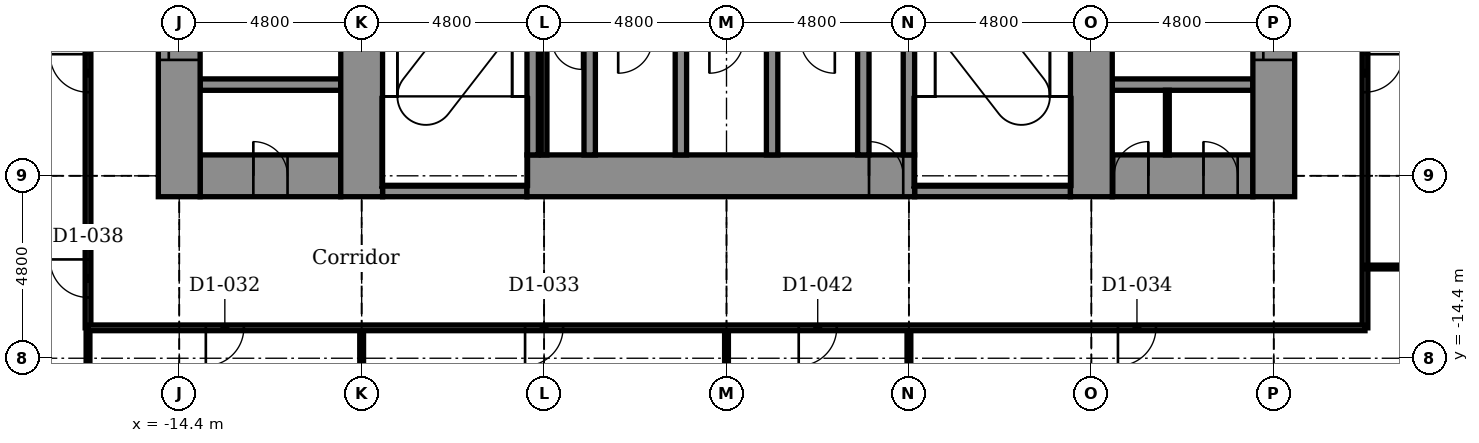
"""IFC4 building model, lengths in metres.
Left out: names, types, materials, properties, quantities, classifications, styles, units other than length and angle.
Written with IfcOpenShell. Run it as: python <this file> out.ifc"""

import sys

from ifc_helpers import new_model, si_unit, direction, frame, frame_2d, origin, place, context, subcontext, project, spatial, rectangle, extrude, element, fill, save


model = new_model("IFC4")
c1 = context("Model", 3, precision=1e-05, world=origin(), true_north=direction((0.0, 1.0)))
c2 = subcontext(c1, "Body", "Model", "MODEL_VIEW")
j1 = project(units=[si_unit("LENGTHUNIT", "METRE"), si_unit("PLANEANGLEUNIT", "RADIAN")], contexts=[c1])
p1 = place(None, origin())
s1 = spatial("IfcSite", under=j1, at=p1, CompositionType="ELEMENT")
p2 = place(p1, origin())
s2 = spatial("IfcBuilding", under=s1, at=p2, CompositionType="ELEMENT")
p3 = place(p2, frame((0.0, 0.0, 12.4)))
s3 = spatial("IfcBuildingStorey", under=s2, at=p3, CompositionType="ELEMENT", Elevation=12.4)
p4 = place(p3, frame((-9.05, -10.0, -0.3), z_axis=(0.0, 0.0, 1.0), x_axis=(1.0, 0.0, 0.0)))
e1 = element("IfcWall", 1, at=p4, inside=s3, PredefinedType="STANDARD", context=c2, shape_type="SweptSolid", body=[
    extrude(rectangle(XDim=3.8, YDim=0.3, at=frame_2d((1.9, 0.0))), origin(), (0.0, 0.0, 1.0), 5.05),
])
p5 = place(p3, frame((4.95, -10.0, -0.3), z_axis=(0.0, 0.0, 1.0), x_axis=(1.0, 0.0, 0.0)))
e2 = element("IfcWall", 2, at=p5, inside=s3, PredefinedType="STANDARD", context=c2, shape_type="SweptSolid", body=[
    extrude(rectangle(XDim=4.1, YDim=0.3, at=frame_2d((2.05, 0.0))), origin(), (0.0, 0.0, 1.0), 5.05),
])
p6 = place(p3, frame((-13.85, -9.6, -0.3), z_axis=(0.0, 0.0, 1.0), x_axis=(1.0, 0.0, 0.0)))
e3 = element("IfcWall", 3, at=p6, inside=s3, PredefinedType="SHEAR", context=c2, shape_type="SweptSolid", body=[
    extrude(rectangle(XDim=3.7, YDim=1.1, at=frame_2d((1.85, 0.0))), origin(), (0.0, 0.0, 1.0), 5.05),
])
p7 = place(p6, frame((1.4, 0.0, 0.3)))
e4 = element("IfcOpeningElement", 4, at=p7, cuts=e3, PredefinedType="OPENING", context=c2, shape_type="SweptSolid", body=[
    extrude(rectangle(XDim=0.9, YDim=2.1, at=frame_2d((0.45, 1.05))), frame((0.0, 0.56, 0.0), z_axis=(0.0, -1.0, 0.0), x_axis=(1.0, 0.0, 0.0)), (0.0, 0.0, 1.0), 1.12),
])
p8 = place(p3, frame((-5.25, -9.6, -0.3), z_axis=(0.0, 0.0, 1.0), x_axis=(1.0, 0.0, 0.0)))
e5 = element("IfcWall", 5, at=p8, inside=s3, PredefinedType="SHEAR", context=c2, shape_type="SweptSolid", body=[
    extrude(rectangle(XDim=10.2, YDim=1.1, at=frame_2d((5.1, 0.0))), origin(), (0.0, 0.0, 1.0), 5.05),
])
p9 = place(p8, frame((9.0, 0.0, 0.3)))
e6 = element("IfcOpeningElement", 6, at=p9, cuts=e5, PredefinedType="OPENING", context=c2, shape_type="SweptSolid", body=[
    extrude(rectangle(XDim=0.9, YDim=2.1, at=frame_2d((0.45, 1.05))), frame((0.0, 0.56, 0.0), z_axis=(0.0, -1.0, 0.0), x_axis=(1.0, 0.0, 0.0)), (0.0, 0.0, 1.0), 1.12),
])
p10 = place(p3, frame((10.15, -9.6, -0.3), z_axis=(0.0, 0.0, 1.0), x_axis=(1.0, 0.0, 0.0)))
e7 = element("IfcWall", 7, at=p10, inside=s3, PredefinedType="SHEAR", context=c2, shape_type="SweptSolid", body=[
    extrude(rectangle(XDim=3.7, YDim=1.1, at=frame_2d((1.85, 0.0))), origin(), (0.0, 0.0, 1.0), 5.05),
])
p11 = place(p10, frame((0.05, 0.0, 0.3)))
e8 = element("IfcOpeningElement", 8, at=p11, cuts=e7, PredefinedType="OPENING", context=c2, shape_type="SweptSolid", body=[
    extrude(rectangle(XDim=0.9, YDim=2.1, at=frame_2d((0.45, 1.05))), frame((0.0, 0.56, 0.0), z_axis=(0.0, -1.0, 0.0), x_axis=(1.0, 0.0, 0.0)), (0.0, 0.0, 1.0), 1.12),
])
p12 = place(p10, frame((2.4, 0.0, 0.3)))
e9 = element("IfcOpeningElement", 9, at=p12, cuts=e7, PredefinedType="OPENING", context=c2, shape_type="SweptSolid", body=[
    extrude(rectangle(XDim=0.9, YDim=2.1, at=frame_2d((0.45, 1.05))), frame((0.0, 0.56, 0.0), z_axis=(0.0, -1.0, 0.0), x_axis=(1.0, 0.0, 0.0)), (0.0, 0.0, 1.0), 1.12),
])
for number, where, z_axis, x_axis in (
    (10, (-13.85, -7.2, -0.3), (0.0, 0.0, 1.0), (1.0, 0.0, 0.0)),
    (11, (10.15, -7.2, -0.3), (0.0, 0.0, 1.0), (1.0, 0.0, 0.0)),
):
    element("IfcWall", number, at=place(p3, frame(where, z_axis=z_axis, x_axis=x_axis)), inside=s3, PredefinedType="STANDARD", context=c2, shape_type="SweptSolid", body=[
        extrude(rectangle(XDim=3.7, YDim=0.3, at=frame_2d((1.85, 0.0))), origin(), (0.0, 0.0, 1.0), 5.05),
    ])
p13 = place(p3, frame((-14.4, -10.15, -0.3), z_axis=(0.0, 0.0, 1.0), x_axis=(0.0, 1.0, 0.0)))
e12 = element("IfcWall", 12, at=p13, inside=s3, PredefinedType="SHEAR", context=c2, shape_type="SweptSolid", body=[
    extrude(rectangle(XDim=20.3, YDim=1.1, at=frame_2d((10.15, 0.0))), origin(), (0.0, 0.0, 1.0), 5.05),
])
p14 = place(p13, frame((3.6, 0.0, 0.3)))
e13 = element("IfcOpeningElement", 13, at=p14, cuts=e12, PredefinedType="OPENING", context=c2, shape_type="SweptSolid", body=[
    extrude(rectangle(XDim=1.1, YDim=2.1, at=frame_2d((0.55, 1.05))), frame((0.0, 0.56, 0.0), z_axis=(0.0, -1.0, 0.0), x_axis=(1.0, 0.0, 0.0)), (0.0, 0.0, 1.0), 1.12),
])
p15 = place(p13, frame((6.0, 0.0, 0.3)))
e14 = element("IfcOpeningElement", 14, at=p15, cuts=e12, PredefinedType="OPENING", context=c2, shape_type="SweptSolid", body=[
    extrude(rectangle(XDim=1.1, YDim=2.1, at=frame_2d((0.55, 1.05))), frame((0.0, 0.56, 0.0), z_axis=(0.0, -1.0, 0.0), x_axis=(1.0, 0.0, 0.0)), (0.0, 0.0, 1.0), 1.12),
])
p16 = place(p13, frame((8.4, 0.0, 0.3)))
e15 = element("IfcOpeningElement", 15, at=p16, cuts=e12, PredefinedType="OPENING", context=c2, shape_type="SweptSolid", body=[
    extrude(rectangle(XDim=1.1, YDim=2.1, at=frame_2d((0.55, 1.05))), frame((0.0, 0.56, 0.0), z_axis=(0.0, -1.0, 0.0), x_axis=(1.0, 0.0, 0.0)), (0.0, 0.0, 1.0), 1.12),
])
p17 = place(p13, frame((10.8, 0.0, 0.3)))
e16 = element("IfcOpeningElement", 16, at=p17, cuts=e12, PredefinedType="OPENING", context=c2, shape_type="SweptSolid", body=[
    extrude(rectangle(XDim=1.1, YDim=2.1, at=frame_2d((0.55, 1.05))), frame((0.0, 0.56, 0.0), z_axis=(0.0, -1.0, 0.0), x_axis=(1.0, 0.0, 0.0)), (0.0, 0.0, 1.0), 1.12),
])
p18 = place(p3, frame((-9.6, -10.15, -0.3), z_axis=(0.0, 0.0, 1.0), x_axis=(0.0, 1.0, 0.0)))
e17 = element("IfcWall", 17, at=p18, inside=s3, PredefinedType="SHEAR", context=c2, shape_type="SweptSolid", body=[
    extrude(rectangle(XDim=7.6, YDim=1.1, at=frame_2d((3.8, 0.0))), origin(), (0.0, 0.0, 1.0), 5.05),
])
p19 = place(p3, frame((-5.1, -9.05, -0.3), z_axis=(0.0, 0.0, 1.0), x_axis=(0.0, 1.0, 0.0)))
e18 = element("IfcWall", 18, at=p19, inside=s3, PredefinedType="STANDARD", context=c2, shape_type="SweptSolid", body=[
    extrude(rectangle(XDim=6.8, YDim=0.3, at=frame_2d((3.4, 0.0))), origin(), (0.0, 0.0, 1.0), 5.05),
])
p20 = place(p19, frame((3.6, 0.0, 0.3)))
e19 = element("IfcOpeningElement", 19, at=p20, cuts=e18, PredefinedType="OPENING", context=c2, shape_type="SweptSolid", body=[
    extrude(rectangle(XDim=1.2, YDim=2.1, at=frame_2d((0.6, 1.05))), frame((0.0, 0.16, 0.0), z_axis=(0.0, -1.0, 0.0), x_axis=(1.0, 0.0, 0.0)), (0.0, 0.0, 1.0), 0.32),
])
for number, where, z_axis, x_axis in (
    (20, (-3.6, -9.05, -0.3), (0.0, 0.0, 1.0), (0.0, 1.0, 0.0)),
    (21, (-1.2, -9.05, -0.3), (0.0, 0.0, 1.0), (0.0, 1.0, 0.0)),
    (22, (1.2, -9.05, -0.3), (0.0, 0.0, 1.0), (0.0, 1.0, 0.0)),
    (23, (3.6, -9.05, -0.3), (0.0, 0.0, 1.0), (0.0, 1.0, 0.0)),
):
    element("IfcWall", number, at=place(p3, frame(where, z_axis=z_axis, x_axis=x_axis)), inside=s3, PredefinedType="STANDARD", context=c2, shape_type="SweptSolid", body=[
        extrude(rectangle(XDim=3.2, YDim=0.3, at=frame_2d((1.6, 0.0))), origin(), (0.0, 0.0, 1.0), 5.05),
    ])
p21 = place(p3, frame((4.8, -9.05, -0.3), z_axis=(0.0, 0.0, 1.0), x_axis=(0.0, 1.0, 0.0)))
e24 = element("IfcWall", 24, at=p21, inside=s3, PredefinedType="STANDARD", context=c2, shape_type="SweptSolid", body=[
    extrude(rectangle(XDim=6.8, YDim=0.3, at=frame_2d((3.4, 0.0))), origin(), (0.0, 0.0, 1.0), 5.05),
])
p22 = place(p21, frame((3.6, 0.0, 0.3)))
e25 = element("IfcOpeningElement", 25, at=p22, cuts=e24, PredefinedType="OPENING", context=c2, shape_type="SweptSolid", body=[
    extrude(rectangle(XDim=1.2, YDim=2.1, at=frame_2d((0.6, 1.05))), frame((0.0, 0.16, 0.0), z_axis=(0.0, -1.0, 0.0), x_axis=(1.0, 0.0, 0.0)), (0.0, 0.0, 1.0), 0.32),
])
p23 = place(p3, frame((9.6, -10.15, -0.3), z_axis=(0.0, 0.0, 1.0), x_axis=(0.0, 1.0, 0.0)))
e26 = element("IfcWall", 26, at=p23, inside=s3, PredefinedType="SHEAR", context=c2, shape_type="SweptSolid", body=[
    extrude(rectangle(XDim=20.3, YDim=1.1, at=frame_2d((10.15, 0.0))), origin(), (0.0, 0.0, 1.0), 5.05),
])
p24 = place(p3, frame((14.4, -10.15, -0.3), z_axis=(0.0, 0.0, 1.0), x_axis=(0.0, 1.0, 0.0)))
e27 = element("IfcWall", 27, at=p24, inside=s3, PredefinedType="SHEAR", context=c2, shape_type="SweptSolid", body=[
    extrude(rectangle(XDim=20.3, YDim=1.1, at=frame_2d((10.15, 0.0))), origin(), (0.0, 0.0, 1.0), 5.05),
])
p25 = place(p24, frame((3.6, 0.0, 0.3)))
e28 = element("IfcOpeningElement", 28, at=p25, cuts=e27, PredefinedType="OPENING", context=c2, shape_type="SweptSolid", body=[
    extrude(rectangle(XDim=1.1, YDim=2.1, at=frame_2d((0.55, 1.05))), frame((0.0, 0.56, 0.0), z_axis=(0.0, -1.0, 0.0), x_axis=(1.0, 0.0, 0.0)), (0.0, 0.0, 1.0), 1.12),
])
p26 = place(p24, frame((6.0, 0.0, 0.3)))
e29 = element("IfcOpeningElement", 29, at=p26, cuts=e27, PredefinedType="OPENING", context=c2, shape_type="SweptSolid", body=[
    extrude(rectangle(XDim=1.1, YDim=2.1, at=frame_2d((0.55, 1.05))), frame((0.0, 0.56, 0.0), z_axis=(0.0, -1.0, 0.0), x_axis=(1.0, 0.0, 0.0)), (0.0, 0.0, 1.0), 1.12),
])
p27 = place(p24, frame((8.4, 0.0, 0.3)))
e30 = element("IfcOpeningElement", 30, at=p27, cuts=e27, PredefinedType="OPENING", context=c2, shape_type="SweptSolid", body=[
    extrude(rectangle(XDim=1.1, YDim=2.1, at=frame_2d((0.55, 1.05))), frame((0.0, 0.56, 0.0), z_axis=(0.0, -1.0, 0.0), x_axis=(1.0, 0.0, 0.0)), (0.0, 0.0, 1.0), 1.12),
])
p28 = place(p24, frame((10.8, 0.0, 0.3)))
e31 = element("IfcOpeningElement", 31, at=p28, cuts=e27, PredefinedType="OPENING", context=c2, shape_type="SweptSolid", body=[
    extrude(rectangle(XDim=1.1, YDim=2.1, at=frame_2d((0.55, 1.05))), frame((0.0, 0.56, 0.0), z_axis=(0.0, -1.0, 0.0), x_axis=(1.0, 0.0, 0.0)), (0.0, 0.0, 1.0), 1.12),
])
p29 = place(p3, frame((16.8, -13.6, 0.0), z_axis=(0.0, 0.0, 1.0), x_axis=(0.0, 1.0, 0.0)))
e32 = element("IfcWall", 32, at=p29, inside=s3, PredefinedType="PARTITIONING", context=c2, shape_type="SweptSolid", body=[
    extrude(rectangle(XDim=9.65, YDim=0.15, at=frame_2d((4.825, 0.0))), origin(), (0.0, 0.0, 1.0), 4.7),
])
p30 = place(p29, frame((6.2, 0.0, 0.0)))
e33 = element("IfcOpeningElement", 33, at=p30, cuts=e32, PredefinedType="OPENING", context=c2, shape_type="SweptSolid", body=[
    extrude(rectangle(XDim=1.0, YDim=2.1, at=frame_2d((0.5, 1.05))), frame((0.0, 0.085, 0.0), z_axis=(0.0, -1.0, 0.0), x_axis=(1.0, 0.0, 0.0)), (0.0, 0.0, 1.0), 0.17),
])
p31 = place(p3, frame((11.6, -9.05, 0.0), z_axis=(0.0, 0.0, 1.0), x_axis=(0.0, 1.0, 0.0)))
e34 = element("IfcWall", 34, at=p31, inside=s3, PredefinedType="PARTITIONING", context=c2, shape_type="SweptSolid", body=[
    extrude(rectangle(XDim=1.7, YDim=0.1, at=frame_2d((0.85, 0.0))), origin(), (0.0, 0.0, 1.0), 4.7),
])
p32 = place(p3, frame((4.8, -19.126, 0.0), z_axis=(0.0, 0.0, 1.0), x_axis=(0.0, 1.0, 0.0)))
e35 = element("IfcWall", 35, at=p32, inside=s3, PredefinedType="PARTITIONING", context=c2, shape_type="SweptSolid", body=[
    extrude(rectangle(XDim=5.526, YDim=0.1, at=frame_2d((2.763, 0.0))), origin(), (0.0, 0.0, 1.0), 4.343),
])
p33 = place(p3, frame((0.0, -18.64, 0.0), z_axis=(0.0, 0.0, 1.0), x_axis=(0.0, 1.0, 0.0)))
e36 = element("IfcWall", 36, at=p33, inside=s3, PredefinedType="PARTITIONING", context=c2, shape_type="SweptSolid", body=[
    extrude(rectangle(XDim=5.04, YDim=0.1, at=frame_2d((2.52, 0.0))), origin(), (0.0, 0.0, 1.0), 4.343),
])
p34 = place(p3, frame((-4.8, -9.05, 0.0), z_axis=(0.0, 0.0, 1.0), x_axis=(0.0, 1.0, 0.0)))
e37 = element("IfcWall", 37, at=p34, inside=s3, PredefinedType="PARTITIONING", context=c2, shape_type="SweptSolid", body=[
    extrude(rectangle(XDim=3.05, YDim=0.15, at=frame_2d((1.525, 0.0))), origin(), (0.0, 0.0, 1.0), 4.7),
])
p35 = place(p3, frame((-9.6, -18.64, 0.0), z_axis=(0.0, 0.0, 1.0), x_axis=(0.0, 1.0, 0.0)))
e38 = element("IfcWall", 38, at=p35, inside=s3, PredefinedType="PARTITIONING", context=c2, shape_type="SweptSolid", body=[
    extrude(rectangle(XDim=5.04, YDim=0.1, at=frame_2d((2.52, 0.0))), origin(), (0.0, 0.0, 1.0), 4.343),
])
p36 = place(p3, frame((-16.8, -41.399, 0.0), z_axis=(0.0, 0.0, 1.0), x_axis=(0.0, 1.0, 0.0)))
e39 = element("IfcWall", 39, at=p36, inside=s3, PredefinedType="PARTITIONING", context=c2, shape_type="SweptSolid", body=[
    extrude(rectangle(XDim=27.799, YDim=0.1, at=frame_2d((13.899, 0.0))), origin(), (0.0, 0.0, 1.0), 4.7),
])
p37 = place(p3, frame((-16.8, -13.6, 0.0), z_axis=(0.0, 0.0, 1.0), x_axis=(0.0, 1.0, 0.0)))
e40 = element("IfcWall", 40, at=p37, inside=s3, PredefinedType="PARTITIONING", context=c2, shape_type="SweptSolid", body=[
    extrude(rectangle(XDim=9.65, YDim=0.15, at=frame_2d((4.825, 0.0))), origin(), (0.0, 0.0, 1.0), 4.7),
])
p38 = place(p37, frame((0.8, 0.0, 0.0)))
e41 = element("IfcOpeningElement", 41, at=p38, cuts=e40, PredefinedType="OPENING", context=c2, shape_type="SweptSolid", body=[
    extrude(rectangle(XDim=1.0, YDim=2.1, at=frame_2d((0.5, 1.05))), frame((0.0, 0.085, 0.0), z_axis=(0.0, -1.0, 0.0), x_axis=(1.0, 0.0, 0.0)), (0.0, 0.0, 1.0), 0.17),
])
p39 = place(p37, frame((6.2, 0.0, 0.0)))
e42 = element("IfcOpeningElement", 42, at=p39, cuts=e40, PredefinedType="OPENING", context=c2, shape_type="SweptSolid", body=[
    extrude(rectangle(XDim=1.0, YDim=2.1, at=frame_2d((0.5, 1.05))), frame((0.0, 0.085, 0.0), z_axis=(0.0, -1.0, 0.0), x_axis=(1.0, 0.0, 0.0)), (0.0, 0.0, 1.0), 0.17),
])
p40 = place(p3, frame((-16.8, -13.6, 0.0), z_axis=(0.0, 0.0, 1.0), x_axis=(1.0, 0.0, 0.0)))
e43 = element("IfcWall", 43, at=p40, inside=s3, PredefinedType="PARTITIONING", context=c2, shape_type="SweptSolid", body=[
    extrude(rectangle(XDim=33.6, YDim=0.15, at=frame_2d((16.8, 0.0))), origin(), (0.0, 0.0, 1.0), 4.7),
])
p41 = place(p40, frame((3.1, 0.0, 0.0)))
e44 = element("IfcOpeningElement", 44, at=p41, cuts=e43, PredefinedType="OPENING", context=c2, shape_type="SweptSolid", body=[
    extrude(rectangle(XDim=1.0, YDim=2.1, at=frame_2d((0.5, 1.05))), frame((0.0, 0.085, 0.0), z_axis=(0.0, -1.0, 0.0), x_axis=(1.0, 0.0, 0.0)), (0.0, 0.0, 1.0), 0.17),
])
p42 = place(p40, frame((11.5, 0.0, 0.0)))
e45 = element("IfcOpeningElement", 45, at=p42, cuts=e43, PredefinedType="OPENING", context=c2, shape_type="SweptSolid", body=[
    extrude(rectangle(XDim=1.0, YDim=2.1, at=frame_2d((0.5, 1.05))), frame((0.0, 0.085, 0.0), z_axis=(0.0, -1.0, 0.0), x_axis=(1.0, 0.0, 0.0)), (0.0, 0.0, 1.0), 0.17),
])
p43 = place(p40, frame((27.1, 0.0, 0.0)))
e46 = element("IfcOpeningElement", 46, at=p43, cuts=e43, PredefinedType="OPENING", context=c2, shape_type="SweptSolid", body=[
    extrude(rectangle(XDim=1.0, YDim=2.1, at=frame_2d((0.5, 1.05))), frame((0.0, 0.085, 0.0), z_axis=(0.0, -1.0, 0.0), x_axis=(1.0, 0.0, 0.0)), (0.0, 0.0, 1.0), 0.17),
])
p44 = place(p40, frame((18.7, 0.0, 0.0)))
e47 = element("IfcOpeningElement", 47, at=p44, cuts=e43, PredefinedType="OPENING", context=c2, shape_type="SweptSolid", body=[
    extrude(rectangle(XDim=1.0, YDim=2.1, at=frame_2d((0.5, 1.05))), frame((0.0, 0.085, 0.0), z_axis=(0.0, -1.0, 0.0), x_axis=(1.0, 0.0, 0.0)), (0.0, 0.0, 1.0), 0.17),
])
p45 = place(p3, frame((16.8, -12.0, 0.0), z_axis=(0.0, 0.0, 1.0), x_axis=(1.0, 0.0, 0.0)))
e48 = element("IfcWall", 48, at=p45, inside=s3, PredefinedType="PARTITIONING", context=c2, shape_type="SweptSolid", body=[
    extrude(rectangle(XDim=23.088, YDim=0.1, at=frame_2d((11.544, 0.0))), origin(), (0.0, 0.0, 1.0), 4.7),
])
p46 = place(p3, frame((-41.51, -11.0, 0.0), z_axis=(0.0, 0.0, 1.0), x_axis=(1.0, 0.0, 0.0)))
e49 = element("IfcWall", 49, at=p46, inside=s3, PredefinedType="PARTITIONING", context=c2, shape_type="SweptSolid", body=[
    extrude(rectangle(XDim=24.71, YDim=0.1, at=frame_2d((12.355, 0.0))), origin(), (0.0, 0.0, 1.0), 4.7),
])
p47 = place(p41, frame((1.0, 0.0, 0.0), z_axis=(0.0, 0.0, 1.0), x_axis=(-1.0, 0.0, 0.0)))
e50 = element("IfcDoor", 50, at=p47, inside=s3, OperationType="SINGLE_SWING_LEFT", PredefinedType="DOOR", context=c2, shape_type="SweptSolid", body=[
    extrude(rectangle(XDim=1.0, YDim=2.1, at=frame_2d((0.5, 1.05))), frame((0.0, 0.025, 0.0), z_axis=(0.0, -1.0, 0.0), x_axis=(1.0, 0.0, 0.0)), (0.0, 0.0, 1.0), 0.05),
])
fill(e44, e50)
p48 = place(p42, frame((1.0, 0.0, 0.0), z_axis=(0.0, 0.0, 1.0), x_axis=(-1.0, 0.0, 0.0)))
e51 = element("IfcDoor", 51, at=p48, inside=s3, OperationType="SINGLE_SWING_LEFT", PredefinedType="DOOR", context=c2, shape_type="SweptSolid", body=[
    extrude(rectangle(XDim=1.0, YDim=2.1, at=frame_2d((0.5, 1.05))), frame((0.0, 0.025, 0.0), z_axis=(0.0, -1.0, 0.0), x_axis=(1.0, 0.0, 0.0)), (0.0, 0.0, 1.0), 0.05),
])
fill(e45, e51)
p49 = place(p43, frame((1.0, 0.0, 0.0), z_axis=(0.0, 0.0, 1.0), x_axis=(-1.0, 0.0, 0.0)))
e52 = element("IfcDoor", 52, at=p49, inside=s3, OperationType="SINGLE_SWING_LEFT", PredefinedType="DOOR", context=c2, shape_type="SweptSolid", body=[
    extrude(rectangle(XDim=1.0, YDim=2.1, at=frame_2d((0.5, 1.05))), frame((0.0, 0.025, 0.0), z_axis=(0.0, -1.0, 0.0), x_axis=(1.0, 0.0, 0.0)), (0.0, 0.0, 1.0), 0.05),
])
fill(e46, e52)
p50 = place(p30, frame((1.0, 0.0, 0.0), z_axis=(0.0, 0.0, 1.0), x_axis=(-1.0, 0.0, 0.0)))
e53 = element("IfcDoor", 53, at=p50, inside=s3, OperationType="SINGLE_SWING_RIGHT", PredefinedType="DOOR", context=c2, shape_type="SweptSolid", body=[
    extrude(rectangle(XDim=1.0, YDim=2.1, at=frame_2d((0.5, 1.05))), frame((0.0, 0.025, 0.0), z_axis=(0.0, -1.0, 0.0), x_axis=(1.0, 0.0, 0.0)), (0.0, 0.0, 1.0), 0.05),
])
fill(e33, e53)
p51 = place(p38, origin())
e54 = element("IfcDoor", 54, at=p51, inside=s3, OperationType="SINGLE_SWING_RIGHT", PredefinedType="DOOR", context=c2, shape_type="SweptSolid", body=[
    extrude(rectangle(XDim=1.0, YDim=2.1, at=frame_2d((0.5, 1.05))), frame((0.0, 0.025, 0.0), z_axis=(0.0, -1.0, 0.0), x_axis=(1.0, 0.0, 0.0)), (0.0, 0.0, 1.0), 0.05),
])
fill(e41, e54)
p52 = place(p39, origin())
e55 = element("IfcDoor", 55, at=p52, inside=s3, OperationType="SINGLE_SWING_RIGHT", PredefinedType="DOOR", context=c2, shape_type="SweptSolid", body=[
    extrude(rectangle(XDim=1.0, YDim=2.1, at=frame_2d((0.5, 1.05))), frame((0.0, 0.025, 0.0), z_axis=(0.0, -1.0, 0.0), x_axis=(1.0, 0.0, 0.0)), (0.0, 0.0, 1.0), 0.05),
])
fill(e42, e55)
p53 = place(p44, frame((1.0, 0.0, 0.0), z_axis=(0.0, 0.0, 1.0), x_axis=(-1.0, 0.0, 0.0)))
e56 = element("IfcDoor", 56, at=p53, inside=s3, OperationType="SINGLE_SWING_LEFT", PredefinedType="DOOR", context=c2, shape_type="SweptSolid", body=[
    extrude(rectangle(XDim=1.0, YDim=2.1, at=frame_2d((0.5, 1.05))), frame((0.0, 0.025, 0.0), z_axis=(0.0, -1.0, 0.0), x_axis=(1.0, 0.0, 0.0)), (0.0, 0.0, 1.0), 0.05),
])
fill(e47, e56)
p54 = place(p25, origin())
e57 = element("IfcDoor", 57, at=p54, inside=s3, OperationType="DOUBLE_DOOR_SLIDING", PredefinedType="DOOR", context=c2, shape_type="SweptSolid", body=[
    extrude(rectangle(XDim=1.1, YDim=2.1, at=frame_2d((0.55, 1.05))), frame((0.0, 0.025, 0.0), z_axis=(0.0, -1.0, 0.0), x_axis=(1.0, 0.0, 0.0)), (0.0, 0.0, 1.0), 0.05),
])
fill(e28, e57)
p55 = place(p14, origin())
e58 = element("IfcDoor", 58, at=p55, inside=s3, OperationType="DOUBLE_DOOR_SLIDING", PredefinedType="DOOR", context=c2, shape_type="SweptSolid", body=[
    extrude(rectangle(XDim=1.1, YDim=2.1, at=frame_2d((0.55, 1.05))), frame((0.0, 0.025, 0.0), z_axis=(0.0, -1.0, 0.0), x_axis=(1.0, 0.0, 0.0)), (0.0, 0.0, 1.0), 0.05),
])
fill(e13, e58)
p56 = place(p11, origin())
e59 = element("IfcDoor", 59, at=p56, inside=s3, OperationType="SINGLE_SWING_RIGHT", PredefinedType="DOOR", context=c2, shape_type="SweptSolid", body=[
    extrude(rectangle(XDim=0.9, YDim=2.1, at=frame_2d((0.45, 1.05))), frame((0.0, 0.025, 0.0), z_axis=(0.0, -1.0, 0.0), x_axis=(1.0, 0.0, 0.0)), (0.0, 0.0, 1.0), 0.05),
])
fill(e8, e59)
p57 = place(p12, origin())
e60 = element("IfcDoor", 60, at=p57, inside=s3, OperationType="SINGLE_SWING_LEFT", PredefinedType="DOOR", context=c2, shape_type="SweptSolid", body=[
    extrude(rectangle(XDim=0.9, YDim=2.1, at=frame_2d((0.45, 1.05))), frame((0.0, 0.025, 0.0), z_axis=(0.0, -1.0, 0.0), x_axis=(1.0, 0.0, 0.0)), (0.0, 0.0, 1.0), 0.05),
])
fill(e9, e60)
p58 = place(p7, origin())
e61 = element("IfcDoor", 61, at=p58, inside=s3, OperationType="SINGLE_SWING_LEFT", PredefinedType="DOOR", context=c2, shape_type="SweptSolid", body=[
    extrude(rectangle(XDim=0.9, YDim=2.1, at=frame_2d((0.45, 1.05))), frame((0.0, 0.025, 0.0), z_axis=(0.0, -1.0, 0.0), x_axis=(1.0, 0.0, 0.0)), (0.0, 0.0, 1.0), 0.05),
])
fill(e4, e61)
p59 = place(p9, origin())
e62 = element("IfcDoor", 62, at=p59, inside=s3, OperationType="SINGLE_SWING_LEFT", PredefinedType="DOOR", context=c2, shape_type="SweptSolid", body=[
    extrude(rectangle(XDim=0.9, YDim=2.1, at=frame_2d((0.45, 1.05))), frame((0.0, 0.025, 0.0), z_axis=(0.0, -1.0, 0.0), x_axis=(1.0, 0.0, 0.0)), (0.0, 0.0, 1.0), 0.05),
])
fill(e6, e62)
save(model, sys.argv[1])
